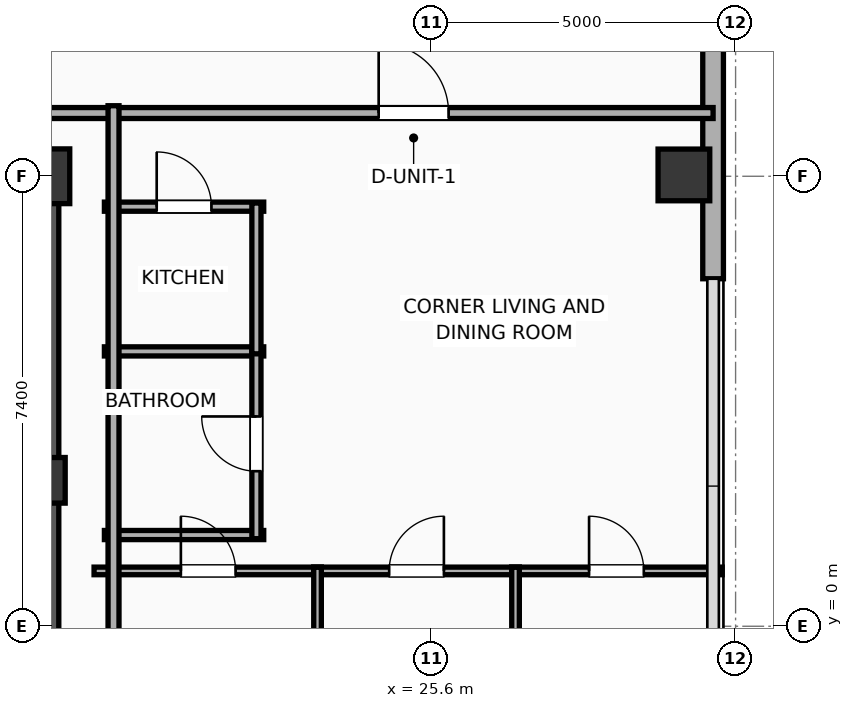
"""IFC4 building model, lengths in metres.
Left out: names, types, materials, properties, quantities, classifications, styles, units other than length and angle.
Written with IfcOpenShell. Run it as: python <this file> out.ifc"""

import sys

from ifc_helpers import new_model, si_unit, direction, frame, frame_2d, origin, origin_2d, place, context, subcontext, project, spatial, rectangle, hollow_rectangle, extrude, element, fill, save


model = new_model("IFC4")
c1 = context("Model", 3, precision=1e-05, world=origin(), true_north=direction((0.0, 1.0)))
c2 = subcontext(c1, "Body", "Model", "MODEL_VIEW")
j1 = project(units=[si_unit("LENGTHUNIT", "METRE"), si_unit("PLANEANGLEUNIT", "RADIAN")], contexts=[c1])
p1 = place(None, origin())
s1 = spatial("IfcSite", under=j1, at=p1, CompositionType="ELEMENT")
p2 = place(p1, origin())
s2 = spatial("IfcBuilding", under=s1, at=p2, CompositionType="ELEMENT")
p3 = place(p2, frame((0.0, 0.0, 211.9)))
s3 = spatial("IfcBuildingStorey", under=s2, at=p3, CompositionType="ELEMENT", Elevation=211.9)
p4 = place(p3, frame((19.2, 2.4, 0.0), z_axis=(0.0, 0.0, 1.0), x_axis=(1.0, 0.0, 0.0)))
e1 = element("IfcColumn", 1, at=p4, inside=s3, PredefinedType="COLUMN", context=c2, shape_type="SweptSolid", body=[
    extrude(rectangle(XDim=0.75, YDim=0.75, at=origin_2d()), origin(), (0.0, 0.0, 1.0), 3.9),
])
p5 = place(p3, frame((19.2, 7.4, 0.0), z_axis=(0.0, 0.0, 1.0), x_axis=(1.0, 0.0, 0.0)))
e2 = element("IfcColumn", 2, at=p5, inside=s3, PredefinedType="COLUMN", context=c2, shape_type="SweptSolid", body=[
    extrude(rectangle(XDim=0.9, YDim=0.9, at=origin_2d()), origin(), (0.0, 0.0, 1.0), 3.9),
])
p6 = place(p3, frame((12.175, 7.4, 0.0), z_axis=(0.0, 0.0, 1.0), x_axis=(1.0, 0.0, 0.0)))
e3 = element("IfcWall", 3, at=p6, inside=s3, PredefinedType="SHEAR", context=c2, shape_type="SweptSolid", body=[
    extrude(rectangle(XDim=7.25, YDim=0.45, at=frame_2d((3.625, 0.0))), origin(), (0.0, 0.0, 1.0), 3.65),
])
p7 = place(p3, frame((19.145, -7.4, 0.0), z_axis=(0.0, 0.0, 1.0), x_axis=(0.0, 1.0, 0.0)))
e4 = element("IfcWall", 4, at=p7, inside=s3, PredefinedType="SHEAR", context=c2, shape_type="SweptSolid", body=[
    extrude(rectangle(XDim=14.8, YDim=0.65, at=frame_2d((7.4, 0.0))), origin(), (0.0, 0.0, 1.0), 3.65),
])
p8 = place(p3, frame((29.75, 7.422, 0.0), z_axis=(0.0, 0.0, 1.0), x_axis=(1.0, 0.0, 0.0)))
e5 = element("IfcColumn", 5, at=p8, inside=s3, PredefinedType="COLUMN", context=c2, shape_type="SweptSolid", body=[
    extrude(hollow_rectangle(XDim=0.85, YDim=0.85, WallThickness=0.028, at=origin_2d()), origin(), (0.0, 0.0, 1.0), 3.9),
])
p9 = place(p3, frame((30.23, 16.583, 0.0), z_axis=(0.0, 0.0, 1.0), x_axis=(0.0, -1.0, 0.0)))
e6 = element("IfcWall", 6, at=p9, inside=s3, PredefinedType="ELEMENTEDWALL", context=c2, shape_type="SweptSolid", body=[
    extrude(rectangle(XDim=10.869, YDim=0.34, at=frame_2d((5.434, 0.0))), origin(), (0.0, 0.0, 1.0), 3.65),
])
p10 = place(p9, frame((4.534, 0.0, 0.75)))
e7 = element("IfcOpeningElement", 7, at=p10, cuts=e6, PredefinedType="OPENING", context=c2, shape_type="SweptSolid", body=[
    extrude(rectangle(XDim=1.8, YDim=2.1, at=frame_2d((0.9, 1.05))), frame((0.0, 0.18, 0.0), z_axis=(0.0, -1.0, 0.0), x_axis=(1.0, 0.0, 0.0)), (0.0, 0.0, 1.0), 0.36),
])
p11 = place(p3, frame((9.88, 8.44, 0.0), z_axis=(0.0, 0.0, 1.0), x_axis=(1.0, 0.0, 0.0)))
e8 = element("IfcWall", 8, at=p11, inside=s3, PredefinedType="PARTITIONING", context=c2, shape_type="SweptSolid", body=[
    extrude(rectangle(XDim=20.35, YDim=0.18, at=frame_2d((10.175, 0.0))), origin(), (0.0, 0.0, 1.0), 3.65),
])
p12 = place(p11, frame((14.85, 0.0, 0.0)))
e9 = element("IfcOpeningElement", 9, at=p12, cuts=e8, PredefinedType="OPENING", context=c2, shape_type="SweptSolid", body=[
    extrude(rectangle(XDim=1.15, YDim=2.05, at=frame_2d((0.575, 1.025))), frame((0.0, 0.1, 0.0), z_axis=(0.0, -1.0, 0.0), x_axis=(1.0, 0.0, 0.0)), (0.0, 0.0, 1.0), 0.2),
])
p13 = place(p3, frame((20.22, 6.9, 0.0), z_axis=(0.0, 0.0, 1.0), x_axis=(1.0, 0.0, 0.0)))
e10 = element("IfcWall", 10, at=p13, inside=s3, PredefinedType="PLUMBINGWALL", context=c2, shape_type="SweptSolid", body=[
    extrude(rectangle(XDim=2.62, YDim=0.15, at=frame_2d((1.31, 0.0))), origin(), (0.0, 0.0, 1.0), 3.65),
])
p14 = place(p13, frame((0.86, 0.0, 0.0)))
e11 = element("IfcOpeningElement", 11, at=p14, cuts=e10, PredefinedType="OPENING", context=c2, shape_type="SweptSolid", body=[
    extrude(rectangle(XDim=0.9, YDim=2.05, at=frame_2d((0.45, 1.025))), frame((0.0, 0.085, 0.0), z_axis=(0.0, -1.0, 0.0), x_axis=(1.0, 0.0, 0.0)), (0.0, 0.0, 1.0), 0.17),
])
for number, where, z_axis, x_axis in (
    (12, (20.22, 4.52, 0.0), (0.0, 0.0, 1.0), (1.0, 0.0, 0.0)),
    (13, (20.22, 1.5, 0.0), (0.0, 0.0, 1.0), (1.0, 0.0, 0.0)),
):
    element("IfcWall", number, at=place(p3, frame(where, z_axis=z_axis, x_axis=x_axis)), inside=s3, PredefinedType="PLUMBINGWALL", context=c2, shape_type="SweptSolid", body=[
        extrude(rectangle(XDim=2.62, YDim=0.15, at=frame_2d((1.31, 0.0))), origin(), (0.0, 0.0, 1.0), 3.65),
    ])
p15 = place(p3, frame((22.72, 1.44, 0.0), z_axis=(0.0, 0.0, 1.0), x_axis=(0.0, 1.0, 0.0)))
e14 = element("IfcWall", 14, at=p15, inside=s3, PredefinedType="PLUMBINGWALL", context=c2, shape_type="SweptSolid", body=[
    extrude(rectangle(XDim=3.12, YDim=0.15, at=frame_2d((1.56, 0.0))), origin(), (0.0, 0.0, 1.0), 3.65),
])
p16 = place(p15, frame((1.11, 0.0, 0.0)))
e15 = element("IfcOpeningElement", 15, at=p16, cuts=e14, PredefinedType="OPENING", context=c2, shape_type="SweptSolid", body=[
    extrude(rectangle(XDim=0.9, YDim=2.05, at=frame_2d((0.45, 1.025))), frame((0.0, 0.085, 0.0), z_axis=(0.0, -1.0, 0.0), x_axis=(1.0, 0.0, 0.0)), (0.0, 0.0, 1.0), 0.17),
])
p17 = place(p3, frame((22.72, 4.48, 0.0), z_axis=(0.0, 0.0, 1.0), x_axis=(0.0, 1.0, 0.0)))
e16 = element("IfcWall", 16, at=p17, inside=s3, PredefinedType="PLUMBINGWALL", context=c2, shape_type="SweptSolid", body=[
    extrude(rectangle(XDim=2.48, YDim=0.15, at=frame_2d((1.24, 0.0))), origin(), (0.0, 0.0, 1.0), 3.65),
])
p18 = place(p3, frame((20.05, 0.91, 0.0), z_axis=(0.0, 0.0, 1.0), x_axis=(1.0, 0.0, 0.0)))
e17 = element("IfcWall", 17, at=p18, inside=s3, PredefinedType="PARTITIONING", context=c2, shape_type="SweptSolid", body=[
    extrude(rectangle(XDim=3.738, YDim=0.125, at=frame_2d((1.869, 0.0))), origin(), (0.0, 0.0, 1.0), 3.65),
])
p19 = place(p18, frame((1.427, 0.0, 0.0)))
e18 = element("IfcOpeningElement", 18, at=p19, cuts=e17, PredefinedType="OPENING", context=c2, shape_type="SweptSolid", body=[
    extrude(rectangle(XDim=0.9, YDim=2.05, at=frame_2d((0.45, 1.025))), frame((0.0, 0.073, 0.0), z_axis=(0.0, -1.0, 0.0), x_axis=(1.0, 0.0, 0.0)), (0.0, 0.0, 1.0), 0.145),
])
p20 = place(p3, frame((23.663, 0.91, 0.0), z_axis=(0.0, 0.0, 1.0), x_axis=(1.0, 0.0, 0.0)))
e19 = element("IfcWall", 19, at=p20, inside=s3, PredefinedType="PARTITIONING", context=c2, shape_type="SweptSolid", body=[
    extrude(rectangle(XDim=3.381, YDim=0.125, at=frame_2d((1.69, 0.0))), origin(), (0.0, 0.0, 1.0), 3.65),
])
p21 = place(p20, frame((1.24, 0.0, 0.0)))
e20 = element("IfcOpeningElement", 20, at=p21, cuts=e19, PredefinedType="OPENING", context=c2, shape_type="SweptSolid", body=[
    extrude(rectangle(XDim=0.9, YDim=2.05, at=frame_2d((0.45, 1.025))), frame((0.0, 0.073, 0.0), z_axis=(0.0, -1.0, 0.0), x_axis=(1.0, 0.0, 0.0)), (0.0, 0.0, 1.0), 0.145),
])
p22 = place(p3, frame((26.918, 0.91, 0.0), z_axis=(0.0, 0.0, 1.0), x_axis=(1.0, 0.0, 0.0)))
e21 = element("IfcWall", 21, at=p22, inside=s3, PredefinedType="PARTITIONING", context=c2, shape_type="SweptSolid", body=[
    extrude(rectangle(XDim=3.461, YDim=0.125, at=frame_2d((1.731, 0.0))), origin(), (0.0, 0.0, 1.0), 3.65),
])
p23 = place(p22, frame((1.272, 0.0, 0.0)))
e22 = element("IfcOpeningElement", 22, at=p23, cuts=e21, PredefinedType="OPENING", context=c2, shape_type="SweptSolid", body=[
    extrude(rectangle(XDim=0.9, YDim=2.05, at=frame_2d((0.45, 1.025))), frame((0.0, 0.073, 0.0), z_axis=(0.0, -1.0, 0.0), x_axis=(1.0, 0.0, 0.0)), (0.0, 0.0, 1.0), 0.145),
])
for number, where, z_axis, x_axis in (
    (23, (26.981, -8.76, 0.0), (0.0, 0.0, 1.0), (0.0, 1.0, 0.0)),
    (24, (23.725, -8.76, 0.0), (0.0, 0.0, 1.0), (0.0, 1.0, 0.0)),
):
    element("IfcWall", number, at=place(p3, frame(where, z_axis=z_axis, x_axis=x_axis)), inside=s3, PredefinedType="PARTITIONING", context=c2, shape_type="SweptSolid", body=[
        extrude(rectangle(XDim=9.73, YDim=0.125, at=frame_2d((4.865, 0.0))), origin(), (0.0, 0.0, 1.0), 3.65),
    ])
p24 = place(p3, frame((20.37, -8.56, 0.0), z_axis=(0.0, 0.0, 1.0), x_axis=(0.0, 1.0, 0.0)))
e25 = element("IfcWall", 25, at=p24, inside=s3, PredefinedType="PARTITIONING", context=c2, shape_type="SweptSolid", body=[
    extrude(rectangle(XDim=17.12, YDim=0.18, at=frame_2d((8.56, 0.0))), origin(), (0.0, 0.0, 1.0), 3.65),
])
p25 = place(p12, origin())
e26 = element("IfcDoor", 26, at=p25, inside=s3, OperationType="SINGLE_SWING_LEFT", PredefinedType="DOOR", context=c2, shape_type="SweptSolid", body=[
    extrude(rectangle(XDim=1.15, YDim=2.05, at=frame_2d((0.575, 1.025))), frame((0.0, 0.025, 0.0), z_axis=(0.0, -1.0, 0.0), x_axis=(1.0, 0.0, 0.0)), (0.0, 0.0, 1.0), 0.05),
])
fill(e9, e26)
p26 = place(p14, origin())
e27 = element("IfcDoor", 27, at=p26, inside=s3, OperationType="SINGLE_SWING_LEFT", PredefinedType="DOOR", context=c2, shape_type="SweptSolid", body=[
    extrude(rectangle(XDim=0.9, YDim=2.05, at=frame_2d((0.45, 1.025))), frame((0.0, 0.025, 0.0), z_axis=(0.0, -1.0, 0.0), x_axis=(1.0, 0.0, 0.0)), (0.0, 0.0, 1.0), 0.05),
])
fill(e11, e27)
p27 = place(p16, origin())
e28 = element("IfcDoor", 28, at=p27, inside=s3, OperationType="SINGLE_SWING_RIGHT", PredefinedType="DOOR", context=c2, shape_type="SweptSolid", body=[
    extrude(rectangle(XDim=0.9, YDim=2.05, at=frame_2d((0.45, 1.025))), frame((0.0, 0.025, 0.0), z_axis=(0.0, -1.0, 0.0), x_axis=(1.0, 0.0, 0.0)), (0.0, 0.0, 1.0), 0.05),
])
fill(e15, e28)
p28 = place(p19, origin())
e29 = element("IfcDoor", 29, at=p28, inside=s3, OperationType="SINGLE_SWING_LEFT", PredefinedType="DOOR", context=c2, shape_type="SweptSolid", body=[
    extrude(rectangle(XDim=0.9, YDim=2.05, at=frame_2d((0.45, 1.025))), frame((0.0, 0.025, 0.0), z_axis=(0.0, -1.0, 0.0), x_axis=(1.0, 0.0, 0.0)), (0.0, 0.0, 1.0), 0.05),
])
fill(e18, e29)
p29 = place(p21, origin())
e30 = element("IfcDoor", 30, at=p29, inside=s3, OperationType="SINGLE_SWING_RIGHT", PredefinedType="DOOR", context=c2, shape_type="SweptSolid", body=[
    extrude(rectangle(XDim=0.9, YDim=2.05, at=frame_2d((0.45, 1.025))), frame((0.0, 0.025, 0.0), z_axis=(0.0, -1.0, 0.0), x_axis=(1.0, 0.0, 0.0)), (0.0, 0.0, 1.0), 0.05),
])
fill(e20, e30)
p30 = place(p23, origin())
e31 = element("IfcDoor", 31, at=p30, inside=s3, OperationType="SINGLE_SWING_LEFT", PredefinedType="DOOR", context=c2, shape_type="SweptSolid", body=[
    extrude(rectangle(XDim=0.9, YDim=2.05, at=frame_2d((0.45, 1.025))), frame((0.0, 0.025, 0.0), z_axis=(0.0, -1.0, 0.0), x_axis=(1.0, 0.0, 0.0)), (0.0, 0.0, 1.0), 0.05),
])
fill(e22, e31)
save(model, sys.argv[1])
